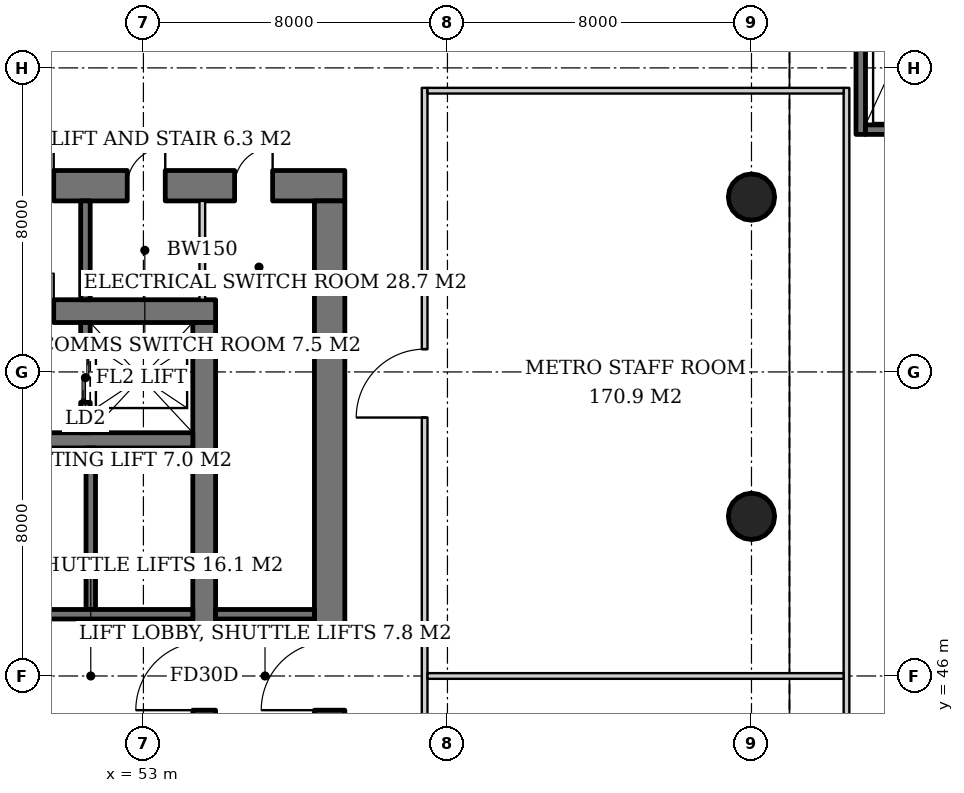
"""IFC4 building model, lengths in metres.
Left out: names, types, materials, properties, quantities, classifications, styles, units other than length and angle.
Written with IfcOpenShell. Run it as: python <this file> out.ifc"""

import sys

from ifc_helpers import new_model, si_unit, direction, frame, frame_2d, origin, origin_2d, place, context, subcontext, project, spatial, rectangle, hollow_circle, extrude, element, fill, save


model = new_model("IFC4")
c1 = context("Model", 3, precision=1e-05, world=origin(), true_north=direction((0.0, 1.0)))
c2 = subcontext(c1, "Body", "Model", "MODEL_VIEW")
j1 = project(units=[si_unit("LENGTHUNIT", "METRE"), si_unit("PLANEANGLEUNIT", "RADIAN")], contexts=[c1])
p1 = place(None, origin())
s1 = spatial("IfcSite", under=j1, at=p1, CompositionType="ELEMENT")
p2 = place(p1, origin())
s2 = spatial("IfcBuilding", under=s1, at=p2, CompositionType="ELEMENT")
p3 = place(p2, frame((0.0, 0.0, -5.0)))
s3 = spatial("IfcBuildingStorey", under=s2, at=p3, CompositionType="ELEMENT", Elevation=-5.0)
for number, where, z_axis, x_axis in (
    (1, (69.0, 50.2, 0.0), (0.0, 0.0, 1.0), (1.0, 0.0, 0.0)),
    (2, (69.0, 58.6, 0.0), (0.0, 0.0, 1.0), (1.0, 0.0, 0.0)),
):
    element("IfcColumn", number, at=place(p3, frame(where, z_axis=z_axis, x_axis=x_axis)), inside=s3, PredefinedType="COLUMN", context=c2, shape_type="SweptSolid", body=[
        extrude(hollow_circle(Radius=0.61, WallThickness=0.04, at=origin_2d()), origin(), (0.0, 0.0, 1.0), 5.0),
    ])
p4 = place(p3, frame((35.1, 55.6, 0.0), z_axis=(0.0, 0.0, 1.0), x_axis=(1.0, 0.0, 0.0)))
e3 = element("IfcWall", 3, at=p4, inside=s3, PredefinedType="SHEAR", context=c2, shape_type="SweptSolid", body=[
    extrude(rectangle(XDim=19.8, YDim=0.6, at=frame_2d((9.9, 0.0))), origin(), (0.0, 0.0, 1.0), 5.0),
])
p5 = place(p4, frame((14.54, 0.0, 0.0)))
e4 = element("IfcOpeningElement", 4, at=p5, cuts=e3, PredefinedType="OPENING", context=c2, shape_type="SweptSolid", body=[
    extrude(rectangle(XDim=1.0, YDim=2.1, at=frame_2d((0.5, 1.05))), frame((0.0, 0.31, 0.0), z_axis=(0.0, -1.0, 0.0), x_axis=(1.0, 0.0, 0.0)), (0.0, 0.0, 1.0), 0.62),
])
p6 = place(p4, frame((12.18, 0.0, 0.0)))
e5 = element("IfcOpeningElement", 5, at=p6, cuts=e3, PredefinedType="OPENING", context=c2, shape_type="SweptSolid", body=[
    extrude(rectangle(XDim=1.0, YDim=2.1, at=frame_2d((0.5, 1.05))), frame((0.0, 0.31, 0.0), z_axis=(0.0, -1.0, 0.0), x_axis=(1.0, 0.0, 0.0)), (0.0, 0.0, 1.0), 0.62),
])
p7 = place(p4, frame((2.425, 0.0, 0.0)))
e6 = element("IfcOpeningElement", 6, at=p7, cuts=e3, PredefinedType="OPENING", context=c2, shape_type="SweptSolid", body=[
    extrude(rectangle(XDim=1.0, YDim=2.1, at=frame_2d((0.5, 1.05))), frame((0.0, 0.31, 0.0), z_axis=(0.0, -1.0, 0.0), x_axis=(1.0, 0.0, 0.0)), (0.0, 0.0, 1.0), 0.62),
])
p8 = place(p3, frame((54.6, 36.7, 0.0), z_axis=(0.0, 0.0, 1.0), x_axis=(0.0, 1.0, 0.0)))
e7 = element("IfcWall", 7, at=p8, inside=s3, PredefinedType="SHEAR", context=c2, shape_type="SweptSolid", body=[
    extrude(rectangle(XDim=18.6, YDim=0.6, at=frame_2d((9.3, 0.0))), origin(), (0.0, 0.0, 1.0), 5.0),
])
p9 = place(p8, frame((8.4, 0.0, 0.0)))
e8 = element("IfcOpeningElement", 8, at=p9, cuts=e7, PredefinedType="OPENING", context=c2, shape_type="SweptSolid", body=[
    extrude(rectangle(XDim=1.8, YDim=2.4, at=frame_2d((0.9, 1.2))), frame((0.0, 0.31, 0.0), z_axis=(0.0, -1.0, 0.0), x_axis=(1.0, 0.0, 0.0)), (0.0, 0.0, 1.0), 0.62),
])
p10 = place(p3, frame((31.7, 58.9, 0.0), z_axis=(0.0, 0.0, 1.0), x_axis=(1.0, 0.0, 0.0)))
e9 = element("IfcWall", 9, at=p10, inside=s3, PredefinedType="SHEAR", context=c2, shape_type="SweptSolid", body=[
    extrude(rectangle(XDim=26.6, YDim=0.8, at=frame_2d((13.3, 0.0))), origin(), (0.0, 0.0, 1.0), 5.0),
])
p11 = place(p10, frame((17.94, 0.0, 0.0)))
e10 = element("IfcOpeningElement", 10, at=p11, cuts=e9, PredefinedType="OPENING", context=c2, shape_type="SweptSolid", body=[
    extrude(rectangle(XDim=1.0, YDim=2.1, at=frame_2d((0.5, 1.05))), frame((0.0, 0.41, 0.0), z_axis=(0.0, -1.0, 0.0), x_axis=(1.0, 0.0, 0.0)), (0.0, 0.0, 1.0), 0.82),
])
p12 = place(p10, frame((12.44, 0.0, 0.0)))
e11 = element("IfcOpeningElement", 11, at=p12, cuts=e9, PredefinedType="OPENING", context=c2, shape_type="SweptSolid", body=[
    extrude(rectangle(XDim=1.0, YDim=2.1, at=frame_2d((0.5, 1.05))), frame((0.0, 0.41, 0.0), z_axis=(0.0, -1.0, 0.0), x_axis=(1.0, 0.0, 0.0)), (0.0, 0.0, 1.0), 0.82),
])
p13 = place(p10, frame((5.825, 0.0, 0.0)))
e12 = element("IfcOpeningElement", 12, at=p13, cuts=e9, PredefinedType="OPENING", context=c2, shape_type="SweptSolid", body=[
    extrude(rectangle(XDim=1.0, YDim=2.1, at=frame_2d((0.5, 1.05))), frame((0.0, 0.41, 0.0), z_axis=(0.0, -1.0, 0.0), x_axis=(1.0, 0.0, 0.0)), (0.0, 0.0, 1.0), 0.82),
])
p14 = place(p10, frame((2.637, 0.0, 0.0)))
e13 = element("IfcOpeningElement", 13, at=p14, cuts=e9, PredefinedType="OPENING", context=c2, shape_type="SweptSolid", body=[
    extrude(rectangle(XDim=1.0, YDim=2.1, at=frame_2d((0.5, 1.05))), frame((0.0, 0.41, 0.0), z_axis=(0.0, -1.0, 0.0), x_axis=(1.0, 0.0, 0.0)), (0.0, 0.0, 1.0), 0.82),
])
p15 = place(p10, frame((20.875, 0.0, 0.0)))
e14 = element("IfcOpeningElement", 14, at=p15, cuts=e9, PredefinedType="OPENING", context=c2, shape_type="SweptSolid", body=[
    extrude(rectangle(XDim=1.0, YDim=2.1, at=frame_2d((0.5, 1.05))), frame((0.0, 0.41, 0.0), z_axis=(0.0, -1.0, 0.0), x_axis=(1.0, 0.0, 0.0)), (0.0, 0.0, 1.0), 0.82),
])
p16 = place(p10, frame((23.7, 0.0, 0.0)))
e15 = element("IfcOpeningElement", 15, at=p16, cuts=e9, PredefinedType="OPENING", context=c2, shape_type="SweptSolid", body=[
    extrude(rectangle(XDim=1.0, YDim=2.1, at=frame_2d((0.5, 1.05))), frame((0.0, 0.41, 0.0), z_axis=(0.0, -1.0, 0.0), x_axis=(1.0, 0.0, 0.0)), (0.0, 0.0, 1.0), 0.82),
])
p17 = place(p3, frame((57.9, 33.5, 0.0), z_axis=(0.0, 0.0, 1.0), x_axis=(0.0, 1.0, 0.0)))
e16 = element("IfcWall", 16, at=p17, inside=s3, PredefinedType="SHEAR", context=c2, shape_type="SweptSolid", body=[
    extrude(rectangle(XDim=25.0, YDim=0.8, at=frame_2d((12.5, 0.0))), origin(), (0.0, 0.0, 1.0), 5.0),
])
p18 = place(p17, frame((11.6, 0.0, 0.0)))
e17 = element("IfcOpeningElement", 17, at=p18, cuts=e16, PredefinedType="OPENING", context=c2, shape_type="SweptSolid", body=[
    extrude(rectangle(XDim=1.8, YDim=2.4, at=frame_2d((0.9, 1.2))), frame((0.0, 0.41, 0.0), z_axis=(0.0, -1.0, 0.0), x_axis=(1.0, 0.0, 0.0)), (0.0, 0.0, 1.0), 0.82),
])
p19 = place(p3, frame((35.7, 52.2, 0.0), z_axis=(0.0, 0.0, 1.0), x_axis=(1.0, 0.0, 0.0)))
e18 = element("IfcWall", 18, at=p19, inside=s3, PredefinedType="SHEAR", context=c2, shape_type="SweptSolid", body=[
    extrude(rectangle(XDim=18.6, YDim=0.4, at=frame_2d((9.3, 0.0))), origin(), (0.0, 0.0, 1.0), 5.0),
])
p20 = place(p3, frame((51.475, 52.4, 0.0), z_axis=(0.0, 0.0, 1.0), x_axis=(0.0, 1.0, 0.0)))
e19 = element("IfcWall", 19, at=p20, inside=s3, PredefinedType="SHEAR", context=c2, shape_type="SweptSolid", body=[
    extrude(rectangle(XDim=2.9, YDim=0.25, at=frame_2d((1.45, 0.0))), origin(), (0.0, 0.0, 1.0), 5.0),
])
p21 = place(p20, frame((0.8, 0.0, 0.0)))
e20 = element("IfcOpeningElement", 20, at=p21, cuts=e19, PredefinedType="OPENING", context=c2, shape_type="SweptSolid", body=[
    extrude(rectangle(XDim=1.3, YDim=2.2, at=frame_2d((0.65, 1.1))), frame((0.0, 0.135, 0.0), z_axis=(0.0, -1.0, 0.0), x_axis=(1.0, 0.0, 0.0)), (0.0, 0.0, 1.0), 0.27),
])
p22 = place(p3, frame((51.615, 47.75, 0.0), z_axis=(0.0, 0.0, 1.0), x_axis=(0.0, 1.0, 0.0)))
e21 = element("IfcWall", 21, at=p22, inside=s3, PredefinedType="SHEAR", context=c2, shape_type="SweptSolid", body=[
    extrude(rectangle(XDim=4.25, YDim=0.25, at=frame_2d((2.125, 0.0))), origin(), (0.0, 0.0, 1.0), 5.0),
])
p23 = place(p3, frame((48.93, 47.625, 0.0), z_axis=(0.0, 0.0, 1.0), x_axis=(1.0, 0.0, 0.0)))
e22 = element("IfcWall", 22, at=p23, inside=s3, PredefinedType="SHEAR", context=c2, shape_type="SweptSolid", body=[
    extrude(rectangle(XDim=5.37, YDim=0.25, at=frame_2d((2.685, 0.0))), origin(), (0.0, 0.0, 1.0), 5.0),
])
for number, where, z_axis, x_axis in (
    (23, (51.475, 55.9, 0.0), (0.0, 0.0, 1.0), (0.0, 1.0, 0.0)),
    (24, (54.9, 47.625, 0.0), (0.0, 0.0, 1.0), (1.0, 0.0, 0.0)),
):
    element("IfcWall", number, at=place(p3, frame(where, z_axis=z_axis, x_axis=x_axis)), inside=s3, PredefinedType="SOLIDWALL", context=c2, shape_type="SweptSolid", body=[
        extrude(rectangle(XDim=2.6, YDim=0.25, at=frame_2d((1.3, 0.0))), origin(), (0.0, 0.0, 1.0), 4.7),
    ])
p24 = place(p3, frame((54.55, 55.9, 0.0), z_axis=(0.0, 0.0, 1.0), x_axis=(0.0, 1.0, 0.0)))
e25 = element("IfcWall", 25, at=p24, inside=s3, PredefinedType="SOLIDWALL", context=c2, shape_type="SweptSolid", body=[
    extrude(rectangle(XDim=2.6, YDim=0.15, at=frame_2d((1.3, 0.0))), origin(), (0.0, 0.0, 1.0), 4.7),
])
p25 = place(p3, frame((71.875, 60.25, 0.0), z_axis=(0.0, 0.0, 1.0), x_axis=(0.0, 1.0, 0.0)))
e26 = element("IfcWall", 26, at=p25, inside=s3, PredefinedType="SOLIDWALL", context=c2, shape_type="SweptSolid", body=[
    extrude(rectangle(XDim=8.5, YDim=0.25, at=frame_2d((4.25, 0.0))), origin(), (0.0, 0.0, 1.0), 4.6),
])
p26 = place(p3, frame((72.0, 60.375, 0.0), z_axis=(0.0, 0.0, 1.0), x_axis=(1.0, 0.0, 0.0)))
e27 = element("IfcWall", 27, at=p26, inside=s3, PredefinedType="SOLIDWALL", context=c2, shape_type="SweptSolid", body=[
    extrude(rectangle(XDim=3.0, YDim=0.25, at=frame_2d((1.5, 0.0))), origin(), (0.0, 0.0, 1.0), 4.6),
])
p27 = place(p3, frame((60.4, 30.6, 0.0), z_axis=(0.0, 0.0, 1.0), x_axis=(0.0, 1.0, 0.0)))
e28 = element("IfcWall", 28, at=p27, inside=s3, PredefinedType="PARTITIONING", context=c2, shape_type="SweptSolid", body=[
    extrude(rectangle(XDim=30.875, YDim=0.15, at=frame_2d((15.438, 0.0))), origin(), (0.0, 0.0, 1.0), 3.688),
])
p28 = place(p27, frame((6.8, 0.0, 0.0)))
e29 = element("IfcOpeningElement", 29, at=p28, cuts=e28, PredefinedType="OPENING", context=c2, shape_type="SweptSolid", body=[
    extrude(rectangle(XDim=1.8, YDim=2.4, at=frame_2d((0.9, 1.2))), frame((0.0, 0.085, 0.0), z_axis=(0.0, -1.0, 0.0), x_axis=(1.0, 0.0, 0.0)), (0.0, 0.0, 1.0), 0.17),
])
p29 = place(p27, frame((22.2, 0.0, 0.0)))
e30 = element("IfcOpeningElement", 30, at=p29, cuts=e28, PredefinedType="OPENING", context=c2, shape_type="SweptSolid", body=[
    extrude(rectangle(XDim=1.8, YDim=2.4, at=frame_2d((0.9, 1.2))), frame((0.0, 0.085, 0.0), z_axis=(0.0, -1.0, 0.0), x_axis=(1.0, 0.0, 0.0)), (0.0, 0.0, 1.0), 0.17),
])
p30 = place(p3, frame((71.5, 30.6, 0.0), z_axis=(0.0, 0.0, 1.0), x_axis=(0.0, 1.0, 0.0)))
e31 = element("IfcWall", 31, at=p30, inside=s3, PredefinedType="PARTITIONING", context=c2, shape_type="SweptSolid", body=[
    extrude(rectangle(XDim=30.875, YDim=0.15, at=frame_2d((15.438, 0.0))), origin(), (0.0, 0.0, 1.0), 4.6),
])
for number, where, z_axis, x_axis in (
    (32, (60.475, 61.4, 0.0), (0.0, 0.0, 1.0), (1.0, 0.0, 0.0)),
    (33, (60.475, 46.0, 0.0), (0.0, 0.0, 1.0), (1.0, 0.0, 0.0)),
):
    element("IfcWall", number, at=place(p3, frame(where, z_axis=z_axis, x_axis=x_axis)), inside=s3, PredefinedType="PARTITIONING", context=c2, shape_type="SweptSolid", body=[
        extrude(rectangle(XDim=10.95, YDim=0.15, at=frame_2d((5.475, 0.0))), origin(), (0.0, 0.0, 1.0), 4.1),
    ])
p31 = place(p21, origin())
e34 = element("IfcDoor", 34, at=p31, inside=s3, OperationType="DOUBLE_DOOR_SLIDING", PredefinedType="DOOR", context=c2, shape_type="SweptSolid", body=[
    extrude(rectangle(XDim=1.3, YDim=2.2, at=frame_2d((0.65, 1.1))), frame((0.0, 0.025, 0.0), z_axis=(0.0, -1.0, 0.0), x_axis=(1.0, 0.0, 0.0)), (0.0, 0.0, 1.0), 0.05),
])
fill(e20, e34)
p32 = place(p5, origin())
e35 = element("IfcDoor", 35, at=p32, inside=s3, OperationType="SINGLE_SWING_RIGHT", PredefinedType="DOOR", context=c2, shape_type="SweptSolid", body=[
    extrude(rectangle(XDim=1.0, YDim=2.1, at=frame_2d((0.5, 1.05))), frame((0.0, 0.025, 0.0), z_axis=(0.0, -1.0, 0.0), x_axis=(1.0, 0.0, 0.0)), (0.0, 0.0, 1.0), 0.05),
])
fill(e4, e35)
p33 = place(p9, origin())
e36 = element("IfcDoor", 36, at=p33, inside=s3, OperationType="DOUBLE_DOOR_SINGLE_SWING", PredefinedType="DOOR", context=c2, shape_type="SweptSolid", body=[
    extrude(rectangle(XDim=1.8, YDim=2.4, at=frame_2d((0.9, 1.2))), frame((0.0, 0.025, 0.0), z_axis=(0.0, -1.0, 0.0), x_axis=(1.0, 0.0, 0.0)), (0.0, 0.0, 1.0), 0.05),
])
fill(e8, e36)
p34 = place(p18, origin())
e37 = element("IfcDoor", 37, at=p34, inside=s3, OperationType="DOUBLE_DOOR_SINGLE_SWING", PredefinedType="DOOR", context=c2, shape_type="SweptSolid", body=[
    extrude(rectangle(XDim=1.8, YDim=2.4, at=frame_2d((0.9, 1.2))), frame((0.0, 0.025, 0.0), z_axis=(0.0, -1.0, 0.0), x_axis=(1.0, 0.0, 0.0)), (0.0, 0.0, 1.0), 0.05),
])
fill(e17, e37)
p35 = place(p11, origin())
e38 = element("IfcDoor", 38, at=p35, inside=s3, OperationType="SINGLE_SWING_RIGHT", PredefinedType="DOOR", context=c2, shape_type="SweptSolid", body=[
    extrude(rectangle(XDim=1.0, YDim=2.1, at=frame_2d((0.5, 1.05))), frame((0.0, 0.025, 0.0), z_axis=(0.0, -1.0, 0.0), x_axis=(1.0, 0.0, 0.0)), (0.0, 0.0, 1.0), 0.05),
])
fill(e10, e38)
p36 = place(p15, origin())
e39 = element("IfcDoor", 39, at=p36, inside=s3, OperationType="SINGLE_SWING_RIGHT", PredefinedType="DOOR", context=c2, shape_type="SweptSolid", body=[
    extrude(rectangle(XDim=1.0, YDim=2.1, at=frame_2d((0.5, 1.05))), frame((0.0, -0.34, 0.0), z_axis=(0.0, -1.0, 0.0), x_axis=(1.0, 0.0, 0.0)), (0.0, 0.0, 1.0), 0.05),
])
fill(e14, e39)
p37 = place(p16, origin())
e40 = element("IfcDoor", 40, at=p37, inside=s3, OperationType="SINGLE_SWING_RIGHT", PredefinedType="DOOR", context=c2, shape_type="SweptSolid", body=[
    extrude(rectangle(XDim=1.0, YDim=2.1, at=frame_2d((0.5, 1.05))), frame((0.0, -0.34, 0.0), z_axis=(0.0, -1.0, 0.0), x_axis=(1.0, 0.0, 0.0)), (0.0, 0.0, 1.0), 0.05),
])
fill(e15, e40)
p38 = place(p29, origin())
e41 = element("IfcDoor", 41, at=p38, inside=s3, OperationType="DOUBLE_DOOR_SINGLE_SWING", PredefinedType="DOOR", context=c2, shape_type="SweptSolid", body=[
    extrude(rectangle(XDim=1.8, YDim=2.4, at=frame_2d((0.9, 1.2))), frame((0.0, 0.025, 0.0), z_axis=(0.0, -1.0, 0.0), x_axis=(1.0, 0.0, 0.0)), (0.0, 0.0, 1.0), 0.05),
])
fill(e30, e41)
save(model, sys.argv[1])
